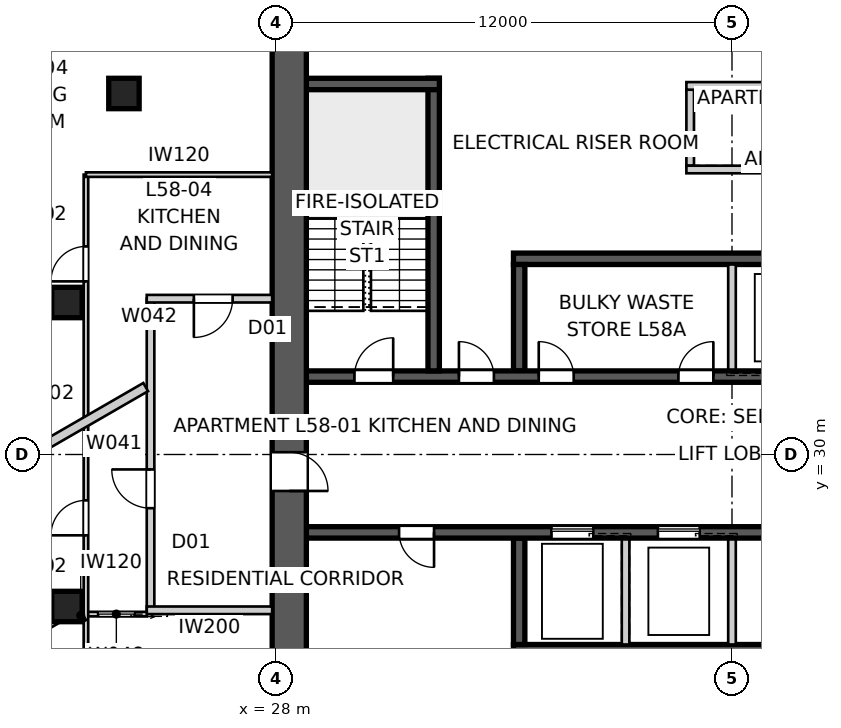
"""IFC4 building model, lengths in metres.
Left out: names, types, materials, properties, quantities, classifications, styles, units other than length and angle.
Written with IfcOpenShell. Run it as: python <this file> out.ifc"""

import sys

from ifc_helpers import new_model, si_unit, direction, frame, frame_2d, origin, origin_2d, place, context, subcontext, project, spatial, polyline, rectangle, outline, extrude, element, fill, save


model = new_model("IFC4")
c1 = context("Model", 3, precision=1e-05, world=origin(), true_north=direction((0.0, 1.0)))
c2 = subcontext(c1, "Body", "Model", "MODEL_VIEW")
j1 = project(units=[si_unit("LENGTHUNIT", "METRE"), si_unit("PLANEANGLEUNIT", "RADIAN")], contexts=[c1])
p1 = place(None, origin())
s1 = spatial("IfcSite", under=j1, at=p1, CompositionType="ELEMENT")
p2 = place(p1, origin())
s2 = spatial("IfcBuilding", under=s1, at=p2, CompositionType="ELEMENT")
p3 = place(p2, frame((0.0, 0.0, 211.6)))
s3 = spatial("IfcBuildingStorey", under=s2, at=p3, CompositionType="ELEMENT", Elevation=211.6)
p4 = place(p3, frame((28.35, 41.2, 0.0), z_axis=(0.0, 0.0, 1.0), x_axis=(0.0, -1.0, 0.0)))
e1 = element("IfcWall", 1, at=p4, inside=s3, PredefinedType="SHEAR", context=c2, shape_type="SweptSolid", body=[
    extrude(outline(polyline([(0.0, -0.45), (22.4, -0.45), (22.4, -0.025), (22.85, -0.025), (22.85, 0.025), (22.4, 0.025), (22.4, 0.45), (0.0, 0.45), (0.0, 0.025), (-0.45, 0.025), (-0.45, -0.025), (0.0, -0.025), (0.0, -0.45)])), origin(), (0.0, 0.0, 1.0), 3.4),
])
p5 = place(p4, frame((11.14, 0.0, 0.0)))
e2 = element("IfcOpeningElement", 2, at=p5, cuts=e1, PredefinedType="OPENING", context=c2, shape_type="SweptSolid", body=[
    extrude(rectangle(XDim=1.02, YDim=2.4, at=frame_2d((0.51, 1.2))), frame((0.0, 0.46, 0.0), z_axis=(0.0, -1.0, 0.0), x_axis=(1.0, 0.0, 0.0)), (0.0, 0.0, 1.0), 0.92),
])
p6 = place(p3, frame((28.8, 32.05, 0.0), z_axis=(0.0, 0.0, 1.0), x_axis=(1.0, 0.0, 0.0)))
e3 = element("IfcWall", 3, at=p6, inside=s3, PredefinedType="SHEAR", context=c2, shape_type="SweptSolid", body=[
    extrude(rectangle(XDim=22.4, YDim=0.3, at=frame_2d((11.2, 0.0))), origin(), (0.0, 0.0, 1.0), 3.4),
])
p7 = place(p6, frame((19.04, 0.0, 0.0)))
e4 = element("IfcOpeningElement", 4, at=p7, cuts=e3, PredefinedType="OPENING", context=c2, shape_type="SweptSolid", body=[
    extrude(rectangle(XDim=0.92, YDim=2.1, at=frame_2d((0.46, 1.05))), frame((0.0, 0.16, 0.0), z_axis=(0.0, -1.0, 0.0), x_axis=(1.0, 0.0, 0.0)), (0.0, 0.0, 1.0), 0.32),
])
p8 = place(p6, frame((1.265, 0.0, 0.0)))
e5 = element("IfcOpeningElement", 5, at=p8, cuts=e3, PredefinedType="OPENING", context=c2, shape_type="SweptSolid", body=[
    extrude(rectangle(XDim=1.02, YDim=2.1, at=frame_2d((0.51, 1.05))), frame((0.0, 0.16, 0.0), z_axis=(0.0, -1.0, 0.0), x_axis=(1.0, 0.0, 0.0)), (0.0, 0.0, 1.0), 0.32),
])
p9 = place(p6, frame((4.015, 0.0, 0.0)))
e6 = element("IfcOpeningElement", 6, at=p9, cuts=e3, PredefinedType="OPENING", context=c2, shape_type="SweptSolid", body=[
    extrude(rectangle(XDim=0.92, YDim=2.1, at=frame_2d((0.46, 1.05))), frame((0.0, 0.16, 0.0), z_axis=(0.0, -1.0, 0.0), x_axis=(1.0, 0.0, 0.0)), (0.0, 0.0, 1.0), 0.32),
])
p10 = place(p6, frame((6.115, 0.0, 0.0)))
e7 = element("IfcOpeningElement", 7, at=p10, cuts=e3, PredefinedType="OPENING", context=c2, shape_type="SweptSolid", body=[
    extrude(rectangle(XDim=0.92, YDim=2.1, at=frame_2d((0.46, 1.05))), frame((0.0, 0.16, 0.0), z_axis=(0.0, -1.0, 0.0), x_axis=(1.0, 0.0, 0.0)), (0.0, 0.0, 1.0), 0.32),
])
p11 = place(p6, frame((9.79, 0.0, 0.0)))
e8 = element("IfcOpeningElement", 8, at=p11, cuts=e3, PredefinedType="OPENING", context=c2, shape_type="SweptSolid", body=[
    extrude(rectangle(XDim=0.92, YDim=2.1, at=frame_2d((0.46, 1.05))), frame((0.0, 0.16, 0.0), z_axis=(0.0, -1.0, 0.0), x_axis=(1.0, 0.0, 0.0)), (0.0, 0.0, 1.0), 0.32),
])
p12 = place(p6, frame((12.05, 0.0, 0.0)))
e9 = element("IfcOpeningElement", 9, at=p12, cuts=e3, PredefinedType="OPENING", context=c2, shape_type="SweptSolid", body=[
    extrude(rectangle(XDim=1.1, YDim=2.1, at=frame_2d((0.55, 1.05))), frame((0.0, 0.16, 0.0), z_axis=(0.0, -1.0, 0.0), x_axis=(1.0, 0.0, 0.0)), (0.0, 0.0, 1.0), 0.32),
])
p13 = place(p6, frame((14.85, 0.0, 0.0)))
e10 = element("IfcOpeningElement", 10, at=p13, cuts=e3, PredefinedType="OPENING", context=c2, shape_type="SweptSolid", body=[
    extrude(rectangle(XDim=1.1, YDim=2.1, at=frame_2d((0.55, 1.05))), frame((0.0, 0.16, 0.0), z_axis=(0.0, -1.0, 0.0), x_axis=(1.0, 0.0, 0.0)), (0.0, 0.0, 1.0), 0.32),
])
p14 = place(p3, frame((51.2, 27.95, 0.0), z_axis=(0.0, 0.0, 1.0), x_axis=(-1.0, 0.0, 0.0)))
e11 = element("IfcWall", 11, at=p14, inside=s3, PredefinedType="SHEAR", context=c2, shape_type="SweptSolid", body=[
    extrude(rectangle(XDim=22.4, YDim=0.3, at=frame_2d((11.2, 0.0))), origin(), (0.0, 0.0, 1.0), 3.4),
])
p15 = place(p14, frame((19.04, 0.0, 0.0)))
e12 = element("IfcOpeningElement", 12, at=p15, cuts=e11, PredefinedType="OPENING", context=c2, shape_type="SweptSolid", body=[
    extrude(rectangle(XDim=0.92, YDim=2.1, at=frame_2d((0.46, 1.05))), frame((0.0, 0.16, 0.0), z_axis=(0.0, -1.0, 0.0), x_axis=(1.0, 0.0, 0.0)), (0.0, 0.0, 1.0), 0.32),
])
p16 = place(p14, frame((1.265, 0.0, 0.0)))
e13 = element("IfcOpeningElement", 13, at=p16, cuts=e11, PredefinedType="OPENING", context=c2, shape_type="SweptSolid", body=[
    extrude(rectangle(XDim=1.02, YDim=2.1, at=frame_2d((0.51, 1.05))), frame((0.0, 0.16, 0.0), z_axis=(0.0, -1.0, 0.0), x_axis=(1.0, 0.0, 0.0)), (0.0, 0.0, 1.0), 0.32),
])
p17 = place(p14, frame((4.015, 0.0, 0.0)))
e14 = element("IfcOpeningElement", 14, at=p17, cuts=e11, PredefinedType="OPENING", context=c2, shape_type="SweptSolid", body=[
    extrude(rectangle(XDim=0.92, YDim=2.1, at=frame_2d((0.46, 1.05))), frame((0.0, 0.16, 0.0), z_axis=(0.0, -1.0, 0.0), x_axis=(1.0, 0.0, 0.0)), (0.0, 0.0, 1.0), 0.32),
])
p18 = place(p14, frame((12.05, 0.0, 0.0)))
e15 = element("IfcOpeningElement", 15, at=p18, cuts=e11, PredefinedType="OPENING", context=c2, shape_type="SweptSolid", body=[
    extrude(rectangle(XDim=1.1, YDim=2.1, at=frame_2d((0.55, 1.05))), frame((0.0, 0.16, 0.0), z_axis=(0.0, -1.0, 0.0), x_axis=(1.0, 0.0, 0.0)), (0.0, 0.0, 1.0), 0.32),
])
p19 = place(p14, frame((14.85, 0.0, 0.0)))
e16 = element("IfcOpeningElement", 16, at=p19, cuts=e11, PredefinedType="OPENING", context=c2, shape_type="SweptSolid", body=[
    extrude(rectangle(XDim=1.1, YDim=2.1, at=frame_2d((0.55, 1.05))), frame((0.0, 0.16, 0.0), z_axis=(0.0, -1.0, 0.0), x_axis=(1.0, 0.0, 0.0)), (0.0, 0.0, 1.0), 0.32),
])
for number, where, z_axis, x_axis in (
    (17, (34.25, 35.15, 0.0), (0.0, 0.0, 1.0), (1.0, 0.0, 0.0)),
    (18, (45.75, 24.85, 0.0), (0.0, 0.0, 1.0), (-1.0, 0.0, 0.0)),
):
    element("IfcWall", number, at=place(p3, frame(where, z_axis=z_axis, x_axis=x_axis)), inside=s3, PredefinedType="SHEAR", context=c2, shape_type="SweptSolid", body=[
        extrude(rectangle(XDim=11.5, YDim=0.3, at=frame_2d((5.75, 0.0))), origin(), (0.0, 0.0, 1.0), 3.4),
    ])
p20 = place(p3, frame((34.4, 32.2, 0.0), z_axis=(0.0, 0.0, 1.0), x_axis=(0.0, 1.0, 0.0)))
e19 = element("IfcWall", 19, at=p20, inside=s3, PredefinedType="SHEAR", context=c2, shape_type="SweptSolid", body=[
    extrude(rectangle(XDim=2.8, YDim=0.3, at=frame_2d((1.4, 0.0))), origin(), (0.0, 0.0, 1.0), 3.4),
])
for number, where, z_axis, x_axis in (
    (20, (40.0, 32.2, 0.0), (0.0, 0.0, 1.0), (0.0, 1.0, 0.0)),
    (21, (40.0, 27.8, 0.0), (0.0, 0.0, 1.0), (0.0, -1.0, 0.0)),
    (22, (37.2, 27.8, 0.0), (0.0, 0.0, 1.0), (0.0, -1.0, 0.0)),
):
    element("IfcWall", number, at=place(p3, frame(where, z_axis=z_axis, x_axis=x_axis)), inside=s3, PredefinedType="SOLIDWALL", context=c2, shape_type="SweptSolid", body=[
        extrude(rectangle(XDim=2.8, YDim=0.2, at=frame_2d((1.4, 0.0))), origin(), (0.0, 0.0, 1.0), 3.4),
    ])
p21 = place(p3, frame((34.4, 27.8, 0.0), z_axis=(0.0, 0.0, 1.0), x_axis=(0.0, -1.0, 0.0)))
e23 = element("IfcWall", 23, at=p21, inside=s3, PredefinedType="SHEAR", context=c2, shape_type="SweptSolid", body=[
    extrude(rectangle(XDim=2.8, YDim=0.3, at=frame_2d((1.4, 0.0))), origin(), (0.0, 0.0, 1.0), 3.4),
])
p22 = place(p3, frame((32.15, 32.2, 0.0), z_axis=(0.0, 0.0, 1.0), x_axis=(0.0, 1.0, 0.0)))
e24 = element("IfcWall", 24, at=p22, inside=s3, PredefinedType="SHEAR", context=c2, shape_type="SweptSolid", body=[
    extrude(rectangle(XDim=7.7, YDim=0.3, at=frame_2d((3.85, 0.0))), origin(), (0.0, 0.0, 1.0), 3.4),
])
p23 = place(p3, frame((28.8, 39.75, 0.0), z_axis=(0.0, 0.0, 1.0), x_axis=(1.0, 0.0, 0.0)))
e25 = element("IfcWall", 25, at=p23, inside=s3, PredefinedType="SHEAR", context=c2, shape_type="SweptSolid", body=[
    extrude(rectangle(XDim=3.5, YDim=0.3, at=frame_2d((1.75, 0.0))), origin(), (0.0, 0.0, 1.0), 3.4),
])
p24 = place(p3, frame((38.9, 37.6, 0.0), z_axis=(0.0, 0.0, 1.0), x_axis=(0.0, 1.0, 0.0)))
e26 = element("IfcWall", 26, at=p24, inside=s3, PredefinedType="SOLIDWALL", context=c2, shape_type="SweptSolid", body=[
    extrude(rectangle(XDim=2.0, YDim=0.2, at=frame_2d((1.0, 0.0))), origin(), (0.0, 0.0, 1.0), 3.4),
])
for number, where, z_axis, x_axis in (
    (27, (38.8, 37.5, 0.0), (0.0, 0.0, 1.0), (1.0, 0.0, 0.0)),
    (28, (38.8, 39.7, 0.0), (0.0, 0.0, 1.0), (1.0, 0.0, 0.0)),
):
    element("IfcWall", number, at=place(p3, frame(where, z_axis=z_axis, x_axis=x_axis)), inside=s3, PredefinedType="SOLIDWALL", context=c2, shape_type="SweptSolid", body=[
        extrude(rectangle(XDim=2.4, YDim=0.2, at=frame_2d((1.2, 0.0))), origin(), (0.0, 0.0, 1.0), 3.4),
    ])
for number, where, z_axis, x_axis in (
    (29, (24.0, 39.5, 0.0), (0.0, 0.0, 1.0), (1.0, 0.0, 0.0)),
    (30, (22.5, 34.0, 0.0), (0.0, 0.0, 1.0), (1.0, 0.0, 0.0)),
    (31, (22.5, 26.0, 0.0), (0.0, 0.0, 1.0), (1.0, 0.0, 0.0)),
):
    element("IfcColumn", number, at=place(p3, frame(where, z_axis=z_axis, x_axis=x_axis)), inside=s3, PredefinedType="COLUMN", context=c2, shape_type="SweptSolid", body=[
        extrude(rectangle(XDim=0.8, YDim=0.8, at=origin_2d()), origin(), (0.0, 0.0, 1.0), 3.4),
    ])
p25 = place(p3, frame((24.7, 25.9, 0.0), z_axis=(0.0, 0.0, 1.0), x_axis=(0.0, 1.0, 0.0)))
e32 = element("IfcWall", 32, at=p25, inside=s3, PredefinedType="PARTITIONING", context=c2, shape_type="SweptSolid", body=[
    extrude(rectangle(XDim=8.2, YDim=0.2, at=frame_2d((4.1, 0.0))), origin(), (0.0, 0.0, 1.0), 3.25),
])
p26 = place(p25, frame((2.687, 0.0, 0.0)))
e33 = element("IfcOpeningElement", 33, at=p26, cuts=e32, PredefinedType="OPENING", context=c2, shape_type="SweptSolid", body=[
    extrude(rectangle(XDim=1.02, YDim=2.34, at=frame_2d((0.51, 1.17))), frame((0.0, 0.11, 0.0), z_axis=(0.0, -1.0, 0.0), x_axis=(1.0, 0.0, 0.0)), (0.0, 0.0, 1.0), 0.22),
])
p27 = place(p3, frame((27.9, 34.1, 0.0), z_axis=(0.0, 0.0, 1.0), x_axis=(-1.0, 0.0, 0.0)))
e34 = element("IfcWall", 34, at=p27, inside=s3, PredefinedType="PARTITIONING", context=c2, shape_type="SweptSolid", body=[
    extrude(rectangle(XDim=3.3, YDim=0.2, at=frame_2d((1.65, 0.0))), origin(), (0.0, 0.0, 1.0), 3.25),
])
p28 = place(p27, frame((1.04, 0.0, 0.0)))
e35 = element("IfcOpeningElement", 35, at=p28, cuts=e34, PredefinedType="OPENING", context=c2, shape_type="SweptSolid", body=[
    extrude(rectangle(XDim=1.02, YDim=2.34, at=frame_2d((0.51, 1.17))), frame((0.0, 0.11, 0.0), z_axis=(0.0, -1.0, 0.0), x_axis=(1.0, 0.0, 0.0)), (0.0, 0.0, 1.0), 0.22),
])
p29 = place(p3, frame((27.9, 25.9, 0.0), z_axis=(0.0, 0.0, 1.0), x_axis=(-1.0, 0.0, 0.0)))
e36 = element("IfcWall", 36, at=p29, inside=s3, PredefinedType="PARTITIONING", context=c2, shape_type="SweptSolid", body=[
    extrude(rectangle(XDim=3.3, YDim=0.2, at=frame_2d((1.65, 0.0))), origin(), (0.0, 0.0, 1.0), 3.25),
])
p30 = place(p3, frame((15.889, 26.761, 0.0), z_axis=(0.0, 0.0, 1.0), x_axis=(0.866024190901, 0.50000210077, 0.0)))
e37 = element("IfcWall", 37, at=p30, inside=s3, PredefinedType="PARTITIONING", context=c2, shape_type="SweptSolid", body=[
    extrude(rectangle(XDim=10.026, YDim=0.25, at=frame_2d((5.013, 0.0))), origin(), (0.0, 0.0, 1.0), 3.25),
])
p31 = place(p3, frame((24.6, 25.8, 0.0), z_axis=(0.0, 0.0, 1.0), x_axis=(-1.0, 0.0, 0.0)))
e38 = element("IfcWall", 38, at=p31, inside=s3, PredefinedType="PARTITIONING", context=c2, shape_type="SweptSolid", body=[
    extrude(rectangle(XDim=1.6, YDim=0.12, at=frame_2d((0.8, 0.0))), origin(), (0.0, 0.0, 1.0), 3.25),
])
p32 = place(p31, frame((0.32, 0.0, 0.0)))
e39 = element("IfcOpeningElement", 39, at=p32, cuts=e38, PredefinedType="OPENING", context=c2, shape_type="SweptSolid", body=[
    extrude(rectangle(XDim=0.96, YDim=2.1, at=frame_2d((0.48, 1.05))), frame((0.0, 0.07, 0.0), z_axis=(0.0, -1.0, 0.0), x_axis=(1.0, 0.0, 0.0)), (0.0, 0.0, 1.0), 0.14),
])
p33 = place(p3, frame((23.0, 20.185, 0.0), z_axis=(0.0, 0.0, 1.0), x_axis=(0.0, 1.0, 0.0)))
e40 = element("IfcWall", 40, at=p33, inside=s3, PredefinedType="PARTITIONING", context=c2, shape_type="SweptSolid", body=[
    extrude(rectangle(XDim=17.18, YDim=0.12, at=frame_2d((8.59, 0.0))), origin(), (0.0, 0.0, 1.0), 2.55),
])
p34 = place(p33, frame((7.688, 0.0, 0.0)))
e41 = element("IfcOpeningElement", 41, at=p34, cuts=e40, PredefinedType="OPENING", context=c2, shape_type="SweptSolid", body=[
    extrude(rectangle(XDim=0.92, YDim=2.34, at=frame_2d((0.46, 1.17))), frame((0.0, 0.07, 0.0), z_axis=(0.0, -1.0, 0.0), x_axis=(1.0, 0.0, 0.0)), (0.0, 0.0, 1.0), 0.14),
])
p35 = place(p33, frame((14.371, 0.0, 0.0)))
e42 = element("IfcOpeningElement", 42, at=p35, cuts=e40, PredefinedType="OPENING", context=c2, shape_type="SweptSolid", body=[
    extrude(rectangle(XDim=0.92, YDim=2.34, at=frame_2d((0.46, 1.17))), frame((0.0, 0.07, 0.0), z_axis=(0.0, -1.0, 0.0), x_axis=(1.0, 0.0, 0.0)), (0.0, 0.0, 1.0), 0.14),
])
p36 = place(p3, frame((22.95, 25.612, 0.0), z_axis=(0.0, 0.0, 1.0), x_axis=(-0.49996389635, 0.866046247233, 0.0)))
e43 = element("IfcWall", 43, at=p36, inside=s3, PredefinedType="PARTITIONING", context=c2, shape_type="SweptSolid", body=[
    extrude(rectangle(XDim=0.35, YDim=0.12, at=frame_2d((0.175, 0.0))), origin(), (0.0, 0.0, 1.0), 3.25),
])
p37 = place(p3, frame((22.775, 25.915, 0.0), z_axis=(0.0, 0.0, 1.0), x_axis=(-0.866019274569, -0.500010615962, 0.0)))
e44 = element("IfcWall", 44, at=p37, inside=s3, PredefinedType="PARTITIONING", context=c2, shape_type="SweptSolid", body=[
    extrude(rectangle(XDim=5.5, YDim=0.12, at=frame_2d((2.75, 0.0))), origin(), (0.0, 0.0, 1.0), 3.25),
])
p38 = place(p37, frame((2.31, 0.0, 0.0)))
e45 = element("IfcOpeningElement", 45, at=p38, cuts=e44, PredefinedType="OPENING", context=c2, shape_type="SweptSolid", body=[
    extrude(rectangle(XDim=0.92, YDim=2.34, at=frame_2d((0.46, 1.17))), frame((0.0, 0.07, 0.0), z_axis=(0.0, -1.0, 0.0), x_axis=(1.0, 0.0, 0.0)), (0.0, 0.0, 1.0), 0.14),
])
p39 = place(p3, frame((23.0, 37.365, 0.0), z_axis=(0.0, 0.0, 1.0), x_axis=(1.0, 0.0, 0.0)))
e46 = element("IfcWall", 46, at=p39, inside=s3, PredefinedType="PARTITIONING", context=c2, shape_type="SweptSolid", body=[
    extrude(rectangle(XDim=4.9, YDim=0.12, at=frame_2d((2.45, 0.0))), origin(), (0.0, 0.0, 1.0), 3.25),
])
p40 = place(p15, origin())
e47 = element("IfcDoor", 47, at=p40, inside=s3, OperationType="SINGLE_SWING_LEFT", PredefinedType="DOOR", context=c2, shape_type="SweptSolid", body=[
    extrude(rectangle(XDim=0.92, YDim=2.1, at=frame_2d((0.46, 1.05))), frame((0.0, 0.025, 0.0), z_axis=(0.0, -1.0, 0.0), x_axis=(1.0, 0.0, 0.0)), (0.0, 0.0, 1.0), 0.05),
])
fill(e12, e47)
p41 = place(p8, origin())
e48 = element("IfcDoor", 48, at=p41, inside=s3, OperationType="SINGLE_SWING_RIGHT", PredefinedType="DOOR", context=c2, shape_type="SweptSolid", body=[
    extrude(rectangle(XDim=1.02, YDim=2.1, at=frame_2d((0.51, 1.05))), frame((0.0, 0.025, 0.0), z_axis=(0.0, -1.0, 0.0), x_axis=(1.0, 0.0, 0.0)), (0.0, 0.0, 1.0), 0.05),
])
fill(e5, e48)
p42 = place(p9, origin())
e49 = element("IfcDoor", 49, at=p42, inside=s3, OperationType="SINGLE_SWING_LEFT", PredefinedType="DOOR", context=c2, shape_type="SweptSolid", body=[
    extrude(rectangle(XDim=0.92, YDim=2.1, at=frame_2d((0.46, 1.05))), frame((0.0, 0.025, 0.0), z_axis=(0.0, -1.0, 0.0), x_axis=(1.0, 0.0, 0.0)), (0.0, 0.0, 1.0), 0.05),
])
fill(e6, e49)
p43 = place(p26, origin())
e50 = element("IfcDoor", 50, at=p43, inside=s3, OperationType="SINGLE_SWING_RIGHT", PredefinedType="DOOR", context=c2, shape_type="SweptSolid", body=[
    extrude(rectangle(XDim=1.02, YDim=2.34, at=frame_2d((0.51, 1.17))), frame((0.0, 0.025, 0.0), z_axis=(0.0, -1.0, 0.0), x_axis=(1.0, 0.0, 0.0)), (0.0, 0.0, 1.0), 0.05),
])
fill(e33, e50)
p44 = place(p28, origin())
e51 = element("IfcDoor", 51, at=p44, inside=s3, OperationType="SINGLE_SWING_RIGHT", PredefinedType="DOOR", context=c2, shape_type="SweptSolid", body=[
    extrude(rectangle(XDim=1.02, YDim=2.34, at=frame_2d((0.51, 1.17))), frame((0.0, 0.025, 0.0), z_axis=(0.0, -1.0, 0.0), x_axis=(1.0, 0.0, 0.0)), (0.0, 0.0, 1.0), 0.05),
])
fill(e35, e51)
p45 = place(p34, origin())
e52 = element("IfcDoor", 52, at=p45, inside=s3, OperationType="SINGLE_SWING_LEFT", PredefinedType="DOOR", context=c2, shape_type="SweptSolid", body=[
    extrude(rectangle(XDim=0.92, YDim=2.34, at=frame_2d((0.46, 1.17))), frame((0.0, 0.025, 0.0), z_axis=(0.0, -1.0, 0.0), x_axis=(1.0, 0.0, 0.0)), (0.0, 0.0, 1.0), 0.05),
])
fill(e41, e52)
p46 = place(p32, origin())
e53 = element("IfcDoor", 53, at=p46, inside=s3, OperationType="SLIDING_TO_LEFT", PredefinedType="DOOR", context=c2, shape_type="SweptSolid", body=[
    extrude(rectangle(XDim=0.96, YDim=2.1, at=frame_2d((0.48, 1.05))), frame((0.0, 0.025, 0.0), z_axis=(0.0, -1.0, 0.0), x_axis=(1.0, 0.0, 0.0)), (0.0, 0.0, 1.0), 0.05),
])
fill(e39, e53)
p47 = place(p35, origin())
e54 = element("IfcDoor", 54, at=p47, inside=s3, OperationType="SINGLE_SWING_LEFT", PredefinedType="DOOR", context=c2, shape_type="SweptSolid", body=[
    extrude(rectangle(XDim=0.92, YDim=2.34, at=frame_2d((0.46, 1.17))), frame((0.0, 0.025, 0.0), z_axis=(0.0, -1.0, 0.0), x_axis=(1.0, 0.0, 0.0)), (0.0, 0.0, 1.0), 0.05),
])
fill(e42, e54)
p48 = place(p10, origin())
e55 = element("IfcDoor", 55, at=p48, inside=s3, OperationType="SINGLE_SWING_LEFT", PredefinedType="DOOR", context=c2, shape_type="SweptSolid", body=[
    extrude(rectangle(XDim=0.92, YDim=2.1, at=frame_2d((0.46, 1.05))), frame((0.0, 0.025, 0.0), z_axis=(0.0, -1.0, 0.0), x_axis=(1.0, 0.0, 0.0)), (0.0, 0.0, 1.0), 0.05),
])
fill(e7, e55)
p49 = place(p11, origin())
e56 = element("IfcDoor", 56, at=p49, inside=s3, OperationType="SINGLE_SWING_RIGHT", PredefinedType="DOOR", context=c2, shape_type="SweptSolid", body=[
    extrude(rectangle(XDim=0.92, YDim=2.1, at=frame_2d((0.46, 1.05))), frame((0.0, 0.025, 0.0), z_axis=(0.0, -1.0, 0.0), x_axis=(1.0, 0.0, 0.0)), (0.0, 0.0, 1.0), 0.05),
])
fill(e8, e56)
p50 = place(p5, origin())
e57 = element("IfcDoor", 57, at=p50, inside=s3, OperationType="SINGLE_SWING_RIGHT", PredefinedType="DOOR", context=c2, shape_type="SweptSolid", body=[
    extrude(rectangle(XDim=1.02, YDim=2.4, at=frame_2d((0.51, 1.2))), frame((0.0, 0.025, 0.0), z_axis=(0.0, -1.0, 0.0), x_axis=(1.0, 0.0, 0.0)), (0.0, 0.0, 1.0), 0.05),
])
fill(e2, e57)
p51 = place(p18, origin())
e58 = element("IfcDoor", 58, at=p51, inside=s3, OperationType="SLIDING_TO_LEFT", PredefinedType="DOOR", context=c2, shape_type="SweptSolid", body=[
    extrude(rectangle(XDim=1.1, YDim=2.1, at=frame_2d((0.55, 1.05))), frame((0.0, 0.025, 0.0), z_axis=(0.0, -1.0, 0.0), x_axis=(1.0, 0.0, 0.0)), (0.0, 0.0, 1.0), 0.05),
])
fill(e15, e58)
p52 = place(p19, origin())
e59 = element("IfcDoor", 59, at=p52, inside=s3, OperationType="SLIDING_TO_LEFT", PredefinedType="DOOR", context=c2, shape_type="SweptSolid", body=[
    extrude(rectangle(XDim=1.1, YDim=2.1, at=frame_2d((0.55, 1.05))), frame((0.0, 0.025, 0.0), z_axis=(0.0, -1.0, 0.0), x_axis=(1.0, 0.0, 0.0)), (0.0, 0.0, 1.0), 0.05),
])
fill(e16, e59)
save(model, sys.argv[1])
